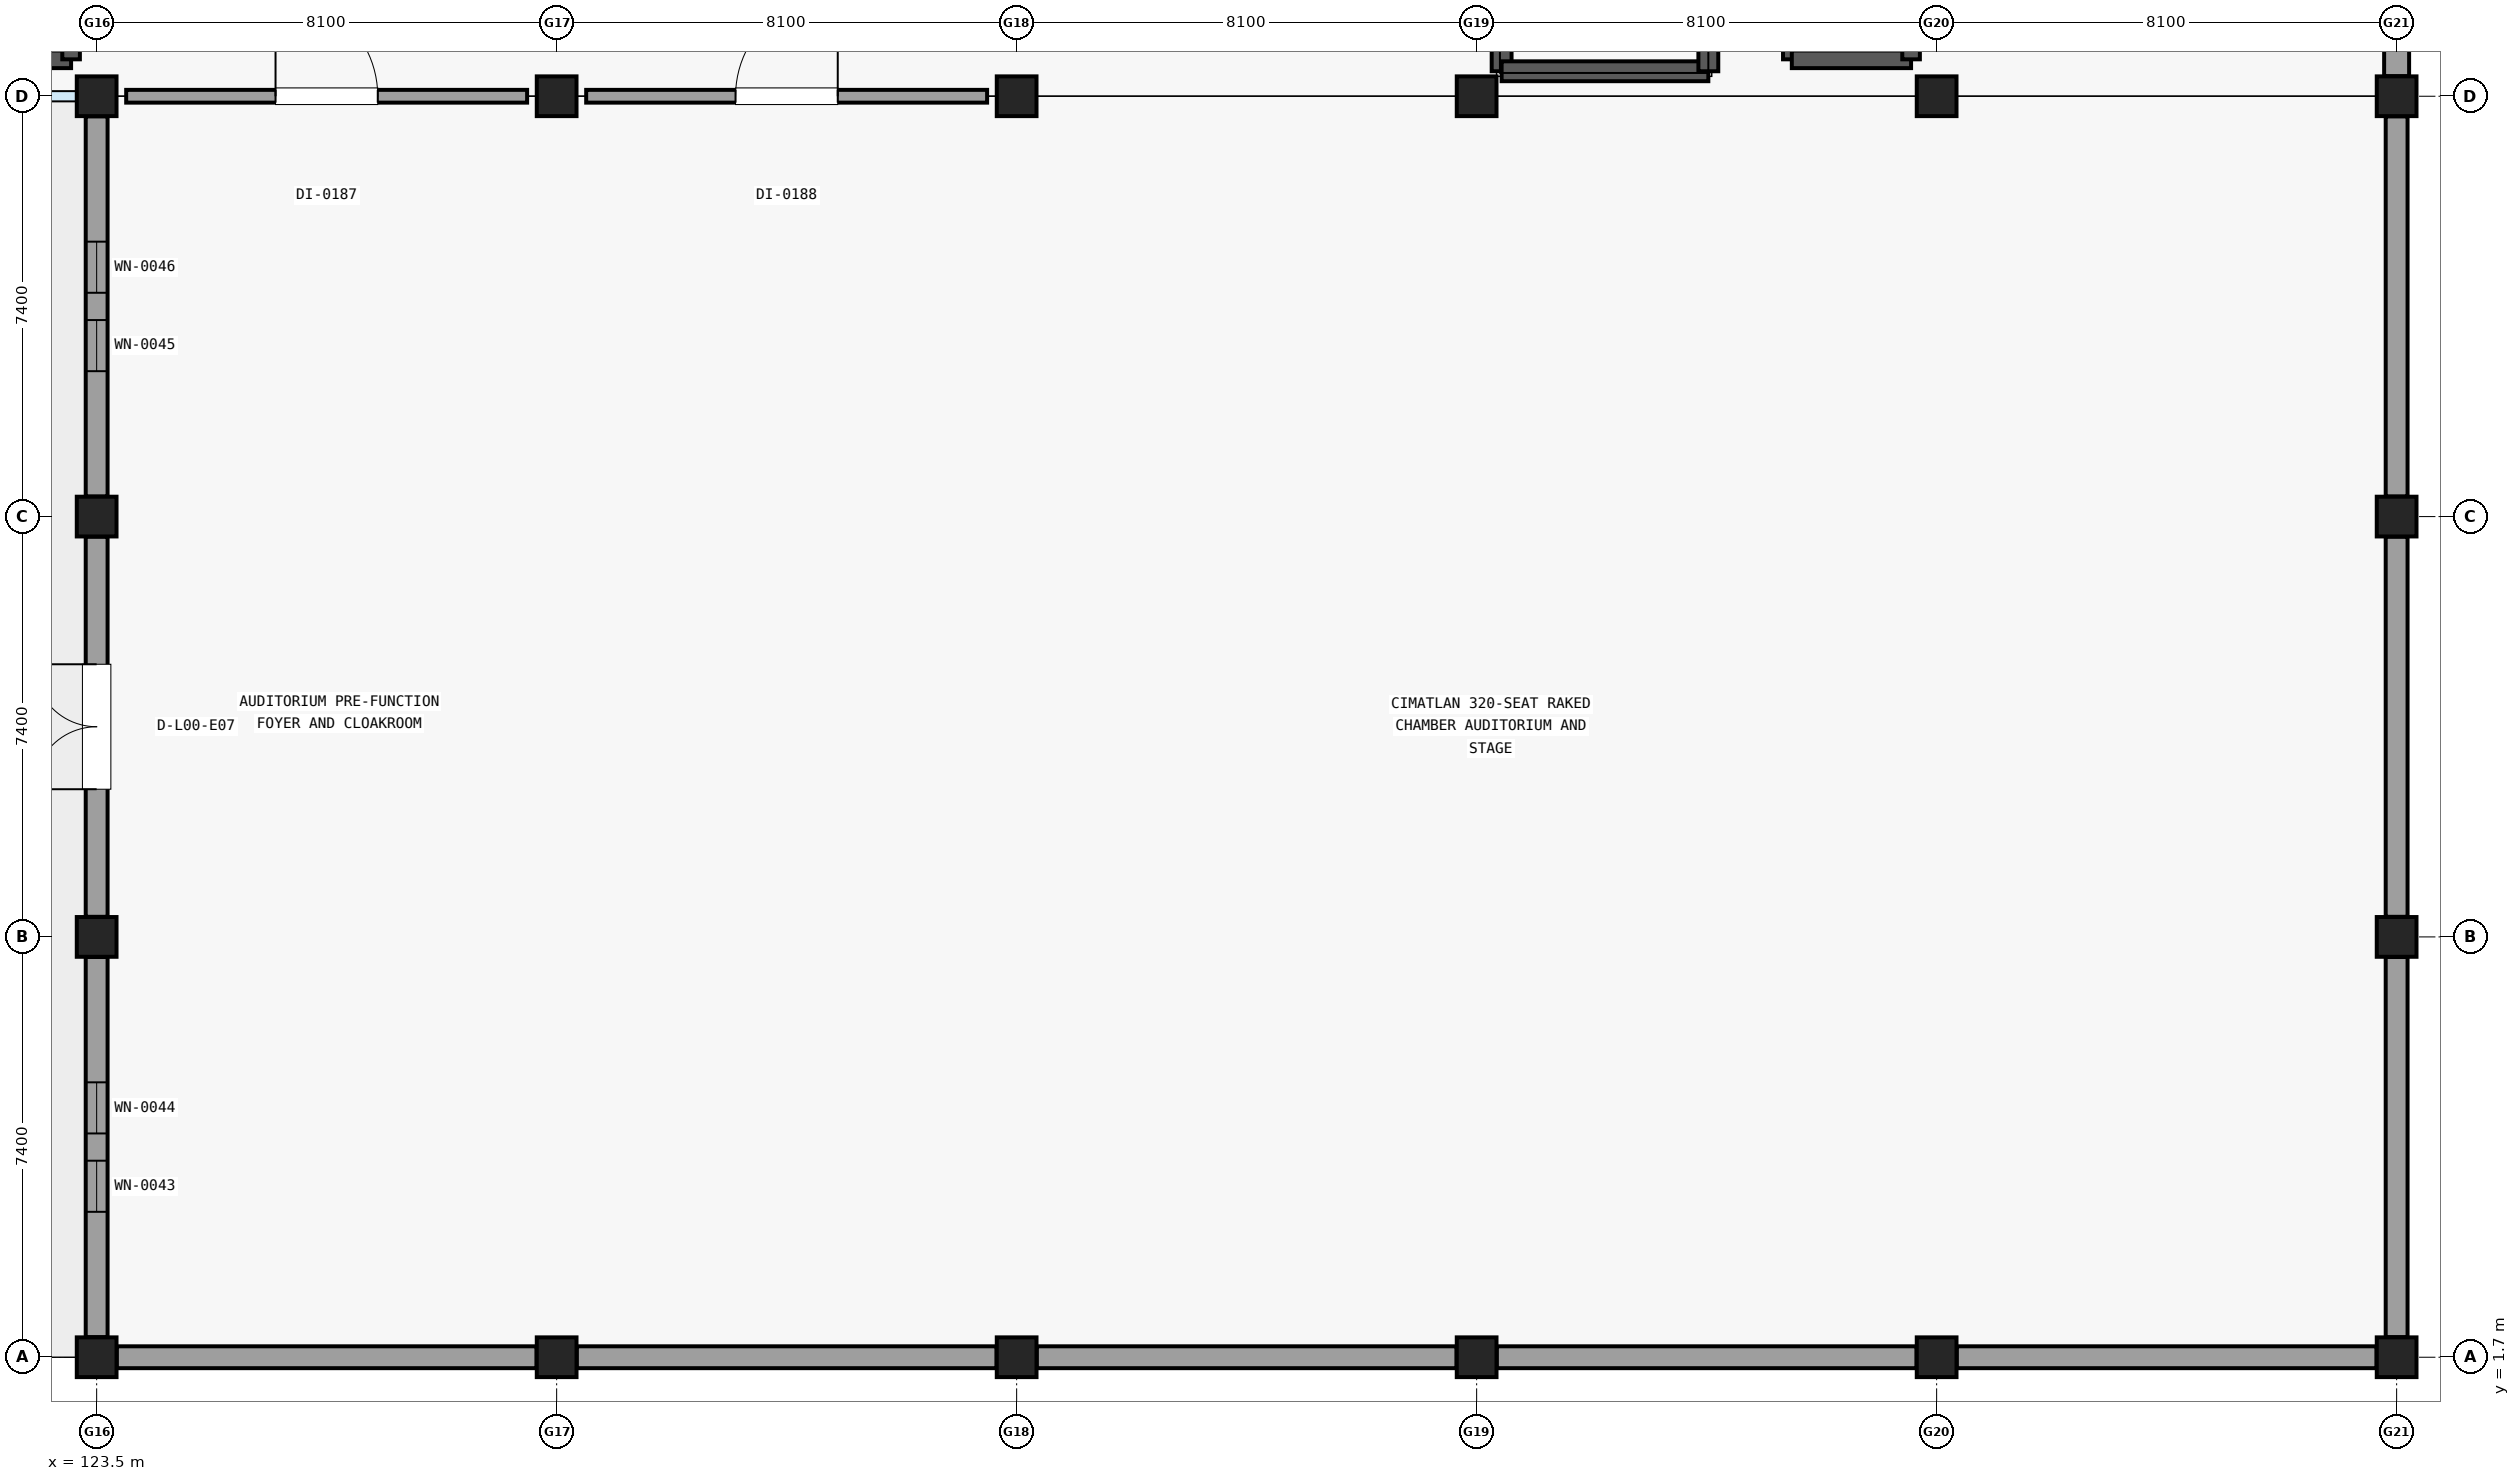
"""IFC4 building model, lengths in metres.
Left out: names, types, materials, properties, quantities, classifications, styles, units other than length and angle.
Written with IfcOpenShell. Run it as: python <this file> out.ifc"""

import sys

from ifc_helpers import new_model, si_unit, direction, frame, frame_2d, origin, origin_2d, place, context, subcontext, project, spatial, rectangle, extrude, element, fill, save


model = new_model("IFC4")
c1 = context("Model", 3, precision=1e-05, world=origin(), true_north=direction((0.0, 1.0)))
c2 = subcontext(c1, "Body", "Model", "MODEL_VIEW")
j1 = project(units=[si_unit("LENGTHUNIT", "METRE"), si_unit("PLANEANGLEUNIT", "RADIAN")], contexts=[c1])
p1 = place(None, origin())
s1 = spatial("IfcSite", under=j1, at=p1, CompositionType="ELEMENT")
p2 = place(p1, origin())
s2 = spatial("IfcBuilding", under=s1, at=p2, CompositionType="ELEMENT")
p3 = place(p2, origin())
s3 = spatial("IfcBuildingStorey", under=s2, at=p3, CompositionType="ELEMENT", Elevation=0.0)
for number, where, z_axis, x_axis in (
    (1, (123.5, 1.7, -0.28), (0.0, 0.0, 1.0), (1.0, 0.0, 0.0)),
    (2, (123.5, 9.1, -0.28), (0.0, 0.0, 1.0), (1.0, 0.0, 0.0)),
    (3, (123.5, 16.5, -0.28), (0.0, 0.0, 1.0), (1.0, 0.0, 0.0)),
):
    element("IfcColumn", number, at=place(p3, frame(where, z_axis=z_axis, x_axis=x_axis)), inside=s3, PredefinedType="COLUMN", context=c2, shape_type="SweptSolid", body=[
        extrude(rectangle(XDim=0.7, YDim=0.7, at=origin_2d()), origin(), (0.0, 0.0, 1.0), 5.415),
    ])
p4 = place(p3, frame((123.5, 23.9, 0.0), z_axis=(0.0, 0.0, 1.0), x_axis=(1.0, 0.0, 0.0)))
e4 = element("IfcColumn", 4, at=p4, inside=s3, PredefinedType="COLUMN", context=c2, shape_type="SweptSolid", body=[
    extrude(rectangle(XDim=0.7, YDim=0.7, at=origin_2d()), origin(), (0.0, 0.0, 1.0), 5.135),
])
p5 = place(p3, frame((131.6, 1.7, -0.28), z_axis=(0.0, 0.0, 1.0), x_axis=(1.0, 0.0, 0.0)))
e5 = element("IfcColumn", 5, at=p5, inside=s3, PredefinedType="COLUMN", context=c2, shape_type="SweptSolid", body=[
    extrude(rectangle(XDim=0.7, YDim=0.7, at=origin_2d()), origin(), (0.0, 0.0, 1.0), 5.415),
])
p6 = place(p3, frame((131.6, 23.9, 0.0), z_axis=(0.0, 0.0, 1.0), x_axis=(1.0, 0.0, 0.0)))
e6 = element("IfcColumn", 6, at=p6, inside=s3, PredefinedType="COLUMN", context=c2, shape_type="SweptSolid", body=[
    extrude(rectangle(XDim=0.7, YDim=0.7, at=origin_2d()), origin(), (0.0, 0.0, 1.0), 5.135),
])
for number, where, z_axis, x_axis in (
    (7, (139.7, 1.7, -0.28), (0.0, 0.0, 1.0), (1.0, 0.0, 0.0)),
    (8, (139.7, 23.9, -0.28), (0.0, 0.0, 1.0), (1.0, 0.0, 0.0)),
    (9, (147.8, 1.7, -0.28), (0.0, 0.0, 1.0), (1.0, 0.0, 0.0)),
    (10, (147.8, 23.9, -0.28), (0.0, 0.0, 1.0), (1.0, 0.0, 0.0)),
    (11, (155.9, 1.7, -0.28), (0.0, 0.0, 1.0), (1.0, 0.0, 0.0)),
    (12, (155.9, 23.9, -0.28), (0.0, 0.0, 1.0), (1.0, 0.0, 0.0)),
    (13, (164.0, 1.7, -0.28), (0.0, 0.0, 1.0), (1.0, 0.0, 0.0)),
    (14, (164.0, 9.1, -0.28), (0.0, 0.0, 1.0), (1.0, 0.0, 0.0)),
    (15, (164.0, 16.5, -0.28), (0.0, 0.0, 1.0), (1.0, 0.0, 0.0)),
    (16, (164.0, 23.9, -0.28), (0.0, 0.0, 1.0), (1.0, 0.0, 0.0)),
):
    element("IfcColumn", number, at=place(p3, frame(where, z_axis=z_axis, x_axis=x_axis)), inside=s3, PredefinedType="COLUMN", context=c2, shape_type="SweptSolid", body=[
        extrude(rectangle(XDim=0.7, YDim=0.7, at=origin_2d()), origin(), (0.0, 0.0, 1.0), 5.415),
    ])
p7 = place(p3, frame((131.246, 1.7, 0.0), z_axis=(0.0, 0.0, 1.0), x_axis=(-1.0, 0.0, 0.0)))
e17 = element("IfcWall", 17, at=p7, inside=s3, PredefinedType="SOLIDWALL", context=c2, shape_type="SweptSolid", body=[
    extrude(rectangle(XDim=7.392, YDim=0.385, at=frame_2d((3.696, 0.0))), origin(), (0.0, 0.0, 1.0), 4.27),
])
p8 = place(p3, frame((123.5, 2.054, 0.0), z_axis=(0.0, 0.0, 1.0), x_axis=(0.0, 1.0, 0.0)))
e18 = element("IfcWall", 18, at=p8, inside=s3, PredefinedType="SOLIDWALL", context=c2, shape_type="SweptSolid", body=[
    extrude(rectangle(XDim=6.692, YDim=0.385, at=frame_2d((3.346, 0.0))), origin(), (0.0, 0.0, 1.0), 4.27),
])
p9 = place(p8, frame((2.206, 0.0, 0.65)))
e19 = element("IfcOpeningElement", 19, at=p9, cuts=e18, PredefinedType="OPENING", context=c2, shape_type="SweptSolid", body=[
    extrude(rectangle(XDim=0.9, YDim=3.4, at=frame_2d((0.45, 1.7))), frame((0.0, 0.203, 0.0), z_axis=(0.0, -1.0, 0.0), x_axis=(1.0, 0.0, 0.0)), (0.0, 0.0, 1.0), 0.405),
])
p10 = place(p8, frame((3.586, 0.0, 0.65)))
e20 = element("IfcOpeningElement", 20, at=p10, cuts=e18, PredefinedType="OPENING", context=c2, shape_type="SweptSolid", body=[
    extrude(rectangle(XDim=0.9, YDim=3.4, at=frame_2d((0.45, 1.7))), frame((0.0, 0.203, 0.0), z_axis=(0.0, -1.0, 0.0), x_axis=(1.0, 0.0, 0.0)), (0.0, 0.0, 1.0), 0.405),
])
p11 = place(p3, frame((123.5, 9.454, 0.0), z_axis=(0.0, 0.0, 1.0), x_axis=(0.0, 1.0, 0.0)))
e21 = element("IfcWall", 21, at=p11, inside=s3, PredefinedType="SOLIDWALL", context=c2, shape_type="SweptSolid", body=[
    extrude(rectangle(XDim=6.692, YDim=0.385, at=frame_2d((3.346, 0.0))), origin(), (0.0, 0.0, 1.0), 4.295),
])
p12 = place(p11, frame((2.246, 0.0, 0.0)))
e22 = element("IfcOpeningElement", 22, at=p12, cuts=e21, PredefinedType="OPENING", context=c2, shape_type="SweptSolid", body=[
    extrude(rectangle(XDim=2.2, YDim=2.4, at=frame_2d((1.1, 1.2))), frame((0.0, 0.203, 0.0), z_axis=(0.0, -1.0, 0.0), x_axis=(1.0, 0.0, 0.0)), (0.0, 0.0, 1.0), 0.405),
])
p13 = place(p3, frame((123.5, 16.854, 0.0), z_axis=(0.0, 0.0, 1.0), x_axis=(0.0, 1.0, 0.0)))
e23 = element("IfcWall", 23, at=p13, inside=s3, PredefinedType="SOLIDWALL", context=c2, shape_type="SweptSolid", body=[
    extrude(rectangle(XDim=6.692, YDim=0.385, at=frame_2d((3.346, 0.0))), origin(), (0.0, 0.0, 1.0), 4.27),
])
p14 = place(p13, frame((2.206, 0.0, 0.65)))
e24 = element("IfcOpeningElement", 24, at=p14, cuts=e23, PredefinedType="OPENING", context=c2, shape_type="SweptSolid", body=[
    extrude(rectangle(XDim=0.9, YDim=3.4, at=frame_2d((0.45, 1.7))), frame((0.0, 0.203, 0.0), z_axis=(0.0, -1.0, 0.0), x_axis=(1.0, 0.0, 0.0)), (0.0, 0.0, 1.0), 0.405),
])
p15 = place(p13, frame((3.586, 0.0, 0.65)))
e25 = element("IfcOpeningElement", 25, at=p15, cuts=e23, PredefinedType="OPENING", context=c2, shape_type="SweptSolid", body=[
    extrude(rectangle(XDim=0.9, YDim=3.4, at=frame_2d((0.45, 1.7))), frame((0.0, 0.203, 0.0), z_axis=(0.0, -1.0, 0.0), x_axis=(1.0, 0.0, 0.0)), (0.0, 0.0, 1.0), 0.405),
])
p16 = place(p3, frame((139.346, 1.7, 0.0), z_axis=(0.0, 0.0, 1.0), x_axis=(-1.0, 0.0, 0.0)))
e26 = element("IfcWall", 26, at=p16, inside=s3, PredefinedType="SOLIDWALL", context=c2, shape_type="SweptSolid", body=[
    extrude(rectangle(XDim=7.392, YDim=0.385, at=frame_2d((3.696, 0.0))), origin(), (0.0, 0.0, 1.0), 4.27),
])
p17 = place(p3, frame((147.446, 1.7, 0.0), z_axis=(0.0, 0.0, 1.0), x_axis=(-1.0, 0.0, 0.0)))
e27 = element("IfcWall", 27, at=p17, inside=s3, PredefinedType="SOLIDWALL", context=c2, shape_type="SweptSolid", body=[
    extrude(rectangle(XDim=7.392, YDim=0.385, at=frame_2d((3.696, 0.0))), origin(), (0.0, 0.0, 1.0), 4.27),
])
p18 = place(p3, frame((155.546, 1.7, 0.0), z_axis=(0.0, 0.0, 1.0), x_axis=(-1.0, 0.0, 0.0)))
e28 = element("IfcWall", 28, at=p18, inside=s3, PredefinedType="SOLIDWALL", context=c2, shape_type="SweptSolid", body=[
    extrude(rectangle(XDim=7.392, YDim=0.385, at=frame_2d((3.696, 0.0))), origin(), (0.0, 0.0, 1.0), 4.27),
])
p19 = place(p3, frame((163.646, 1.7, 0.0), z_axis=(0.0, 0.0, 1.0), x_axis=(-1.0, 0.0, 0.0)))
e29 = element("IfcWall", 29, at=p19, inside=s3, PredefinedType="SOLIDWALL", context=c2, shape_type="SweptSolid", body=[
    extrude(rectangle(XDim=7.392, YDim=0.385, at=frame_2d((3.696, 0.0))), origin(), (0.0, 0.0, 1.0), 4.27),
])
p20 = place(p3, frame((164.0, 8.746, 0.0), z_axis=(0.0, 0.0, 1.0), x_axis=(0.0, -1.0, 0.0)))
e30 = element("IfcWall", 30, at=p20, inside=s3, PredefinedType="SOLIDWALL", context=c2, shape_type="SweptSolid", body=[
    extrude(rectangle(XDim=6.692, YDim=0.385, at=frame_2d((3.346, 0.0))), origin(), (0.0, 0.0, 1.0), 4.27),
])
p21 = place(p3, frame((164.0, 16.146, 0.0), z_axis=(0.0, 0.0, 1.0), x_axis=(0.0, -1.0, 0.0)))
e31 = element("IfcWall", 31, at=p21, inside=s3, PredefinedType="SOLIDWALL", context=c2, shape_type="SweptSolid", body=[
    extrude(rectangle(XDim=6.692, YDim=0.385, at=frame_2d((3.346, 0.0))), origin(), (0.0, 0.0, 1.0), 4.32),
])
p22 = place(p3, frame((164.0, 23.546, 0.0), z_axis=(0.0, 0.0, 1.0), x_axis=(0.0, -1.0, 0.0)))
e32 = element("IfcWall", 32, at=p22, inside=s3, PredefinedType="SOLIDWALL", context=c2, shape_type="SweptSolid", body=[
    extrude(rectangle(XDim=6.692, YDim=0.385, at=frame_2d((3.346, 0.0))), origin(), (0.0, 0.0, 1.0), 4.27),
])
p23 = place(p3, frame((164.0, 30.946, 0.0), z_axis=(0.0, 0.0, 1.0), x_axis=(0.0, -1.0, 0.0)))
e33 = element("IfcWall", 33, at=p23, inside=s3, PredefinedType="SOLIDWALL", context=c2, shape_type="SweptSolid", body=[
    extrude(rectangle(XDim=6.692, YDim=0.44, at=frame_2d((3.346, 0.0))), origin(), (0.0, 0.0, 1.0), 4.27),
])
p24 = place(p3, frame((120.95, 24.55, 0.0), z_axis=(0.0, 0.0, 1.0), x_axis=(1.0, 0.0, 0.0)))
e34 = element("IfcWall", 34, at=p24, inside=s3, PredefinedType="SHEAR", context=c2, shape_type="SweptSolid", body=[
    extrude(rectangle(XDim=2.1, YDim=0.31, at=frame_2d((1.05, 0.0))), origin(), (0.0, 0.0, 1.0), 5.13),
])
p25 = place(p3, frame((123.05, 24.55, 0.0), z_axis=(0.0, 0.0, 1.0), x_axis=(0.0, 1.0, 0.0)))
e35 = element("IfcWall", 35, at=p25, inside=s3, PredefinedType="SHEAR", context=c2, shape_type="SweptSolid", body=[
    extrude(rectangle(XDim=2.6, YDim=0.31, at=frame_2d((1.3, 0.0))), origin(), (0.0, 0.0, 1.0), 5.13),
])
p26 = place(p3, frame((148.24, 24.34, 0.0), z_axis=(0.0, 0.0, 1.0), x_axis=(0.0, 1.0, 0.0)))
e36 = element("IfcWall", 36, at=p26, inside=s3, PredefinedType="SHEAR", context=c2, shape_type="SweptSolid", body=[
    extrude(rectangle(XDim=6.52, YDim=0.35, at=frame_2d((3.26, 0.0))), origin(), (0.0, 0.0, 1.0), 5.13),
])
p27 = place(p3, frame((148.24, 24.34, 0.0), z_axis=(0.0, 0.0, 1.0), x_axis=(1.0, 0.0, 0.0)))
e37 = element("IfcWall", 37, at=p27, inside=s3, PredefinedType="SHEAR", context=c2, shape_type="SweptSolid", body=[
    extrude(rectangle(XDim=3.64, YDim=0.35, at=frame_2d((1.82, 0.0))), origin(), (0.0, 0.0, 1.0), 5.13),
])
p28 = place(p3, frame((151.88, 24.34, 0.0), z_axis=(0.0, 0.0, 1.0), x_axis=(0.0, 1.0, 0.0)))
e38 = element("IfcWall", 38, at=p28, inside=s3, PredefinedType="SHEAR", context=c2, shape_type="SweptSolid", body=[
    extrude(rectangle(XDim=6.52, YDim=0.35, at=frame_2d((3.26, 0.0))), origin(), (0.0, 0.0, 1.0), 5.13),
])
p29 = place(p3, frame((153.35, 24.55, 0.0), z_axis=(0.0, 0.0, 1.0), x_axis=(0.0, 1.0, 0.0)))
e39 = element("IfcWall", 39, at=p29, inside=s3, PredefinedType="SHEAR", context=c2, shape_type="SweptSolid", body=[
    extrude(rectangle(XDim=2.6, YDim=0.31, at=frame_2d((1.3, 0.0))), origin(), (0.0, 0.0, 1.0), 5.13),
])
p30 = place(p3, frame((153.35, 24.55, 0.0), z_axis=(0.0, 0.0, 1.0), x_axis=(1.0, 0.0, 0.0)))
e40 = element("IfcWall", 40, at=p30, inside=s3, PredefinedType="SHEAR", context=c2, shape_type="SweptSolid", body=[
    extrude(rectangle(XDim=2.1, YDim=0.31, at=frame_2d((1.05, 0.0))), origin(), (0.0, 0.0, 1.0), 5.13),
])
p31 = place(p3, frame((155.45, 24.55, 0.0), z_axis=(0.0, 0.0, 1.0), x_axis=(0.0, 1.0, 0.0)))
e41 = element("IfcWall", 41, at=p31, inside=s3, PredefinedType="SHEAR", context=c2, shape_type="SweptSolid", body=[
    extrude(rectangle(XDim=2.6, YDim=0.31, at=frame_2d((1.3, 0.0))), origin(), (0.0, 0.0, 1.0), 5.13),
])
p32 = place(p3, frame((124.02, 23.9, 0.0), z_axis=(0.0, 0.0, 1.0), x_axis=(1.0, 0.0, 0.0)))
e42 = element("IfcWall", 42, at=p32, inside=s3, PredefinedType="PARTITIONING", context=c2, shape_type="SweptSolid", body=[
    extrude(rectangle(XDim=7.06, YDim=0.225, at=frame_2d((3.53, 0.0))), origin(), (0.0, 0.0, 1.0), 4.275),
])
p33 = place(p32, frame((2.63, 0.0, 0.0)))
e43 = element("IfcOpeningElement", 43, at=p33, cuts=e42, PredefinedType="OPENING", context=c2, shape_type="SweptSolid", body=[
    extrude(rectangle(XDim=1.8, YDim=2.4, at=frame_2d((0.9, 1.2))), frame((0.0, 0.123, 0.0), z_axis=(0.0, -1.0, 0.0), x_axis=(1.0, 0.0, 0.0)), (0.0, 0.0, 1.0), 0.245),
])
p34 = place(p3, frame((132.12, 23.9, 0.0), z_axis=(0.0, 0.0, 1.0), x_axis=(1.0, 0.0, 0.0)))
e44 = element("IfcWall", 44, at=p34, inside=s3, PredefinedType="PARTITIONING", context=c2, shape_type="SweptSolid", body=[
    extrude(rectangle(XDim=7.06, YDim=0.225, at=frame_2d((3.53, 0.0))), origin(), (0.0, 0.0, 1.0), 4.275),
])
p35 = place(p34, frame((2.63, 0.0, 0.0)))
e45 = element("IfcOpeningElement", 45, at=p35, cuts=e44, PredefinedType="OPENING", context=c2, shape_type="SweptSolid", body=[
    extrude(rectangle(XDim=1.8, YDim=2.4, at=frame_2d((0.9, 1.2))), frame((0.0, 0.123, 0.0), z_axis=(0.0, -1.0, 0.0), x_axis=(1.0, 0.0, 0.0)), (0.0, 0.0, 1.0), 0.245),
])
p36 = place(p9, origin())
e46 = element("IfcWindow", 46, at=p36, inside=s3, PartitioningType="SINGLE_PANEL", PredefinedType="WINDOW", context=c2, shape_type="SweptSolid", body=[
    extrude(rectangle(XDim=0.9, YDim=3.4, at=frame_2d((0.45, 1.7))), frame((0.0, 0.03, 0.0), z_axis=(0.0, -1.0, 0.0), x_axis=(1.0, 0.0, 0.0)), (0.0, 0.0, 1.0), 0.06),
])
fill(e19, e46)
p37 = place(p10, origin())
e47 = element("IfcWindow", 47, at=p37, inside=s3, PartitioningType="SINGLE_PANEL", PredefinedType="WINDOW", context=c2, shape_type="SweptSolid", body=[
    extrude(rectangle(XDim=0.9, YDim=3.4, at=frame_2d((0.45, 1.7))), frame((0.0, 0.03, 0.0), z_axis=(0.0, -1.0, 0.0), x_axis=(1.0, 0.0, 0.0)), (0.0, 0.0, 1.0), 0.06),
])
fill(e20, e47)
p38 = place(p12, origin())
e48 = element("IfcDoor", 48, at=p38, inside=s3, OperationType="DOUBLE_SWING_LEFT", PredefinedType="DOOR", context=c2, shape_type="SweptSolid", body=[
    extrude(rectangle(XDim=2.2, YDim=2.4, at=frame_2d((1.1, 1.2))), frame((0.0, 0.025, 0.0), z_axis=(0.0, -1.0, 0.0), x_axis=(1.0, 0.0, 0.0)), (0.0, 0.0, 1.0), 0.05),
])
fill(e22, e48)
p39 = place(p14, origin())
e49 = element("IfcWindow", 49, at=p39, inside=s3, PartitioningType="SINGLE_PANEL", PredefinedType="WINDOW", context=c2, shape_type="SweptSolid", body=[
    extrude(rectangle(XDim=0.9, YDim=3.4, at=frame_2d((0.45, 1.7))), frame((0.0, 0.03, 0.0), z_axis=(0.0, -1.0, 0.0), x_axis=(1.0, 0.0, 0.0)), (0.0, 0.0, 1.0), 0.06),
])
fill(e24, e49)
p40 = place(p15, origin())
e50 = element("IfcWindow", 50, at=p40, inside=s3, PartitioningType="SINGLE_PANEL", PredefinedType="WINDOW", context=c2, shape_type="SweptSolid", body=[
    extrude(rectangle(XDim=0.9, YDim=3.4, at=frame_2d((0.45, 1.7))), frame((0.0, 0.03, 0.0), z_axis=(0.0, -1.0, 0.0), x_axis=(1.0, 0.0, 0.0)), (0.0, 0.0, 1.0), 0.06),
])
fill(e25, e50)
p41 = place(p33, origin())
e51 = element("IfcDoor", 51, at=p41, inside=s3, OperationType="SINGLE_SWING_LEFT", PredefinedType="DOOR", context=c2, shape_type="SweptSolid", body=[
    extrude(rectangle(XDim=1.8, YDim=2.4, at=frame_2d((0.9, 1.2))), frame((0.0, 0.025, 0.0), z_axis=(0.0, -1.0, 0.0), x_axis=(1.0, 0.0, 0.0)), (0.0, 0.0, 1.0), 0.05),
])
fill(e43, e51)
p42 = place(p35, origin())
e52 = element("IfcDoor", 52, at=p42, inside=s3, OperationType="SINGLE_SWING_RIGHT", PredefinedType="DOOR", context=c2, shape_type="SweptSolid", body=[
    extrude(rectangle(XDim=1.8, YDim=2.4, at=frame_2d((0.9, 1.2))), frame((0.0, 0.025, 0.0), z_axis=(0.0, -1.0, 0.0), x_axis=(1.0, 0.0, 0.0)), (0.0, 0.0, 1.0), 0.05),
])
fill(e45, e52)
save(model, sys.argv[1])
